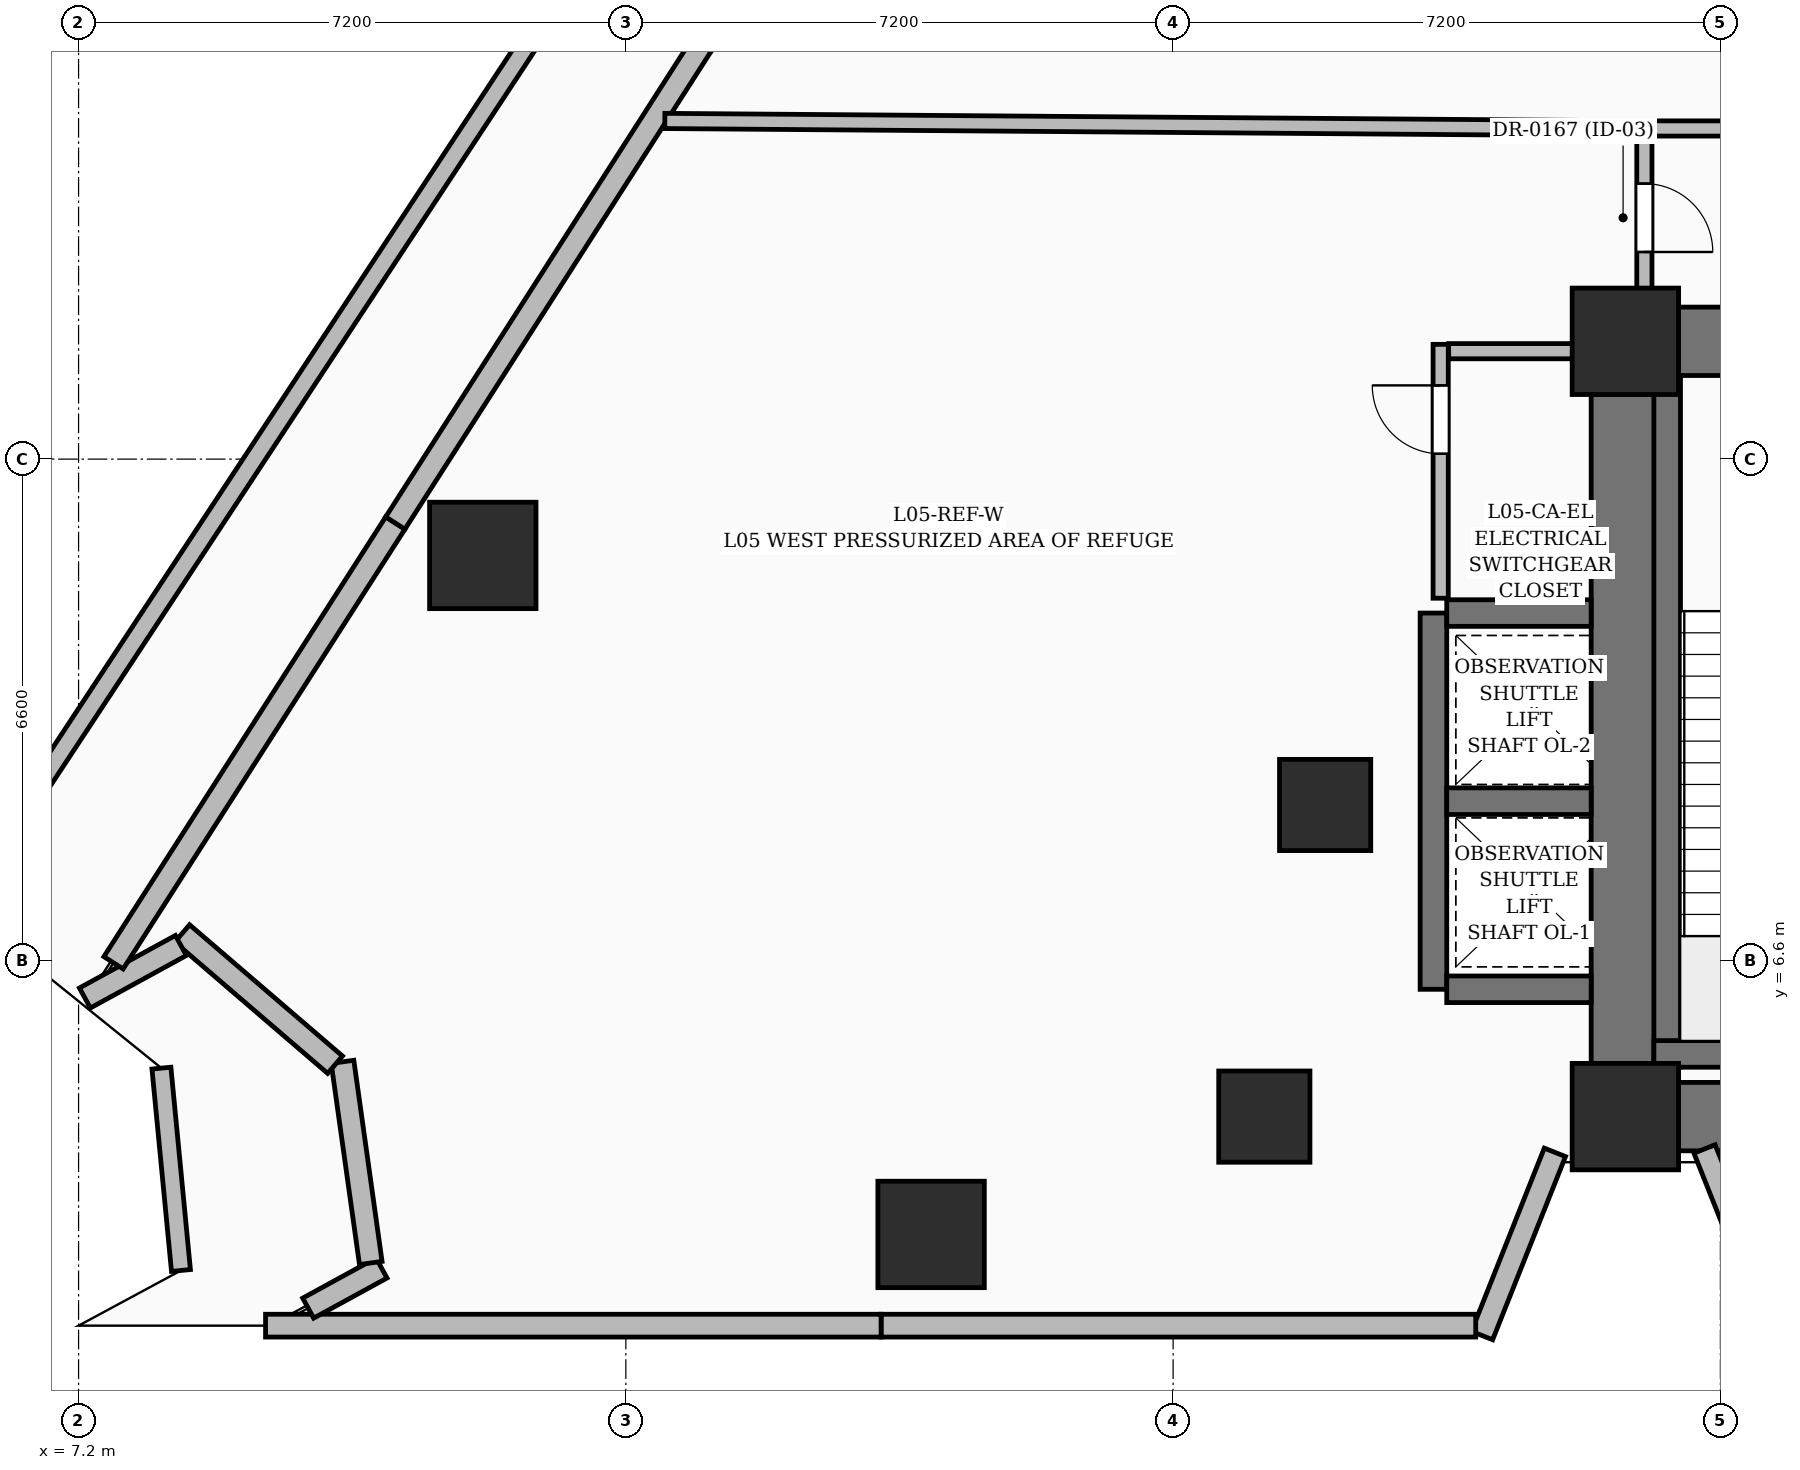
"""IFC4 building model, lengths in metres.
Left out: names, types, materials, properties, quantities, classifications, styles, units other than length and angle.
Written with IfcOpenShell. Run it as: python <this file> out.ifc"""

import sys

from ifc_helpers import new_model, si_unit, direction, frame, frame_2d, origin, origin_2d, place, context, subcontext, project, spatial, rectangle, extrude, element, fill, save


model = new_model("IFC4")
c1 = context("Model", 3, precision=1e-05, world=origin(), true_north=direction((0.0, 1.0)))
c2 = subcontext(c1, "Body", "Model", "MODEL_VIEW")
j1 = project(units=[si_unit("LENGTHUNIT", "METRE"), si_unit("PLANEANGLEUNIT", "RADIAN")], contexts=[c1])
p1 = place(None, origin())
s1 = spatial("IfcSite", under=j1, at=p1, CompositionType="ELEMENT")
p2 = place(p1, origin())
s2 = spatial("IfcBuilding", under=s1, at=p2, CompositionType="ELEMENT")
p3 = place(p2, frame((0.0, 0.0, 26.4)))
s3 = spatial("IfcBuildingStorey", under=s2, at=p3, CompositionType="ELEMENT", Elevation=26.4)
for number, where, z_axis, x_axis in (
    (1, (27.55, 4.55, 0.0), (0.0, 0.0, 1.0), (1.0, 0.0, 0.0)),
    (2, (27.55, 14.75, 0.0), (0.0, 0.0, 1.0), (1.0, 0.0, 0.0)),
):
    element("IfcColumn", number, at=place(p3, frame(where, z_axis=z_axis, x_axis=x_axis)), inside=s3, PredefinedType="COLUMN", context=c2, shape_type="SweptSolid", body=[
        extrude(rectangle(XDim=1.4, YDim=1.4, at=origin_2d()), origin(), (0.0, 0.0, 1.0), 5.4),
    ])
for number, where, z_axis, x_axis in (
    (3, (22.8, 4.55, 0.0), (0.0, 0.0, 1.0), (1.0, 0.0, 0.0)),
    (4, (23.6, 8.65, 0.0), (0.0, 0.0, 1.0), (1.0, 0.0, 0.0)),
):
    element("IfcColumn", number, at=place(p3, frame(where, z_axis=z_axis, x_axis=x_axis)), inside=s3, PredefinedType="COLUMN", context=c2, shape_type="SweptSolid", body=[
        extrude(rectangle(XDim=1.2, YDim=1.2, at=origin_2d()), origin(), (0.0, 0.0, 1.0), 5.4),
    ])
p4 = place(p3, frame((28.25, 4.55, 0.0), z_axis=(0.0, 0.0, 1.0), x_axis=(1.0, 0.0, 0.0)))
e5 = element("IfcWall", 5, at=p4, inside=s3, PredefinedType="SHEAR", context=c2, shape_type="SweptSolid", body=[
    extrude(rectangle(XDim=6.2, YDim=0.9, at=frame_2d((3.1, 0.0))), origin(), (0.0, 0.0, 1.0), 5.4),
])
p5 = place(p3, frame((28.25, 14.75, 0.0), z_axis=(0.0, 0.0, 1.0), x_axis=(1.0, 0.0, 0.0)))
e6 = element("IfcWall", 6, at=p5, inside=s3, PredefinedType="SHEAR", context=c2, shape_type="SweptSolid", body=[
    extrude(rectangle(XDim=6.2, YDim=0.9, at=frame_2d((3.1, 0.0))), origin(), (0.0, 0.0, 1.0), 5.4),
])
p6 = place(p5, frame((0.925, 0.0, 0.0)))
e7 = element("IfcOpeningElement", 7, at=p6, cuts=e6, PredefinedType="OPENING", context=c2, shape_type="SweptSolid", body=[
    extrude(rectangle(XDim=1.05, YDim=2.15, at=frame_2d((0.525, 1.075))), frame((0.0, 0.46, 0.0), z_axis=(0.0, -1.0, 0.0), x_axis=(1.0, 0.0, 0.0)), (0.0, 0.0, 1.0), 0.92),
])
p7 = place(p3, frame((27.55, 5.25, 0.0), z_axis=(0.0, 0.0, 1.0), x_axis=(0.0, 1.0, 0.0)))
e8 = element("IfcWall", 8, at=p7, inside=s3, PredefinedType="SHEAR", context=c2, shape_type="SweptSolid", body=[
    extrude(rectangle(XDim=8.8, YDim=0.9, at=frame_2d((4.4, 0.0))), origin(), (0.0, 0.0, 1.0), 5.4),
])
p8 = place(p3, frame((28.1, 5.2, 0.0), z_axis=(0.0, 0.0, 1.0), x_axis=(0.0, 1.0, 0.0)))
e9 = element("IfcWall", 9, at=p8, inside=s3, PredefinedType="SOLIDWALL", context=c2, shape_type="SweptSolid", body=[
    extrude(rectangle(XDim=9.1, YDim=0.35, at=frame_2d((4.55, 0.0))), origin(), (0.0, 0.0, 1.0), 5.4),
])
p9 = place(p3, frame((27.925, 5.375, 0.0), z_axis=(0.0, 0.0, 1.0), x_axis=(1.0, 0.0, 0.0)))
e10 = element("IfcWall", 10, at=p9, inside=s3, PredefinedType="SOLIDWALL", context=c2, shape_type="SweptSolid", body=[
    extrude(rectangle(XDim=3.55, YDim=0.35, at=frame_2d((1.775, 0.0))), origin(), (0.0, 0.0, 1.0), 5.4),
])
p10 = place(p3, frame((25.025, 6.225, 0.0), z_axis=(0.0, 0.0, 1.0), x_axis=(0.0, 1.0, 0.0)))
e11 = element("IfcWall", 11, at=p10, inside=s3, PredefinedType="SOLIDWALL", context=c2, shape_type="SweptSolid", body=[
    extrude(rectangle(XDim=4.95, YDim=0.35, at=frame_2d((2.475, 0.0))), origin(), (0.0, 0.0, 1.0), 5.4),
])
for number, where, z_axis, x_axis in (
    (12, (25.2, 6.225, 0.0), (0.0, 0.0, 1.0), (1.0, 0.0, 0.0)),
    (13, (25.2, 8.7, 0.0), (0.0, 0.0, 1.0), (1.0, 0.0, 0.0)),
    (14, (25.2, 11.175, 0.0), (0.0, 0.0, 1.0), (1.0, 0.0, 0.0)),
):
    element("IfcWall", number, at=place(p3, frame(where, z_axis=z_axis, x_axis=x_axis)), inside=s3, PredefinedType="SOLIDWALL", context=c2, shape_type="SweptSolid", body=[
        extrude(rectangle(XDim=1.9, YDim=0.35, at=frame_2d((0.95, 0.0))), origin(), (0.0, 0.0, 1.0), 5.4),
    ])
for number, where, z_axis, x_axis in (
    (15, (18.416, 3.0, 0.0), (0.0, 0.0, 1.0), (1.0, 0.0, 0.0)),
    (16, (12.518, 11.933, 0.0), (0.0, 0.0, 1.0), (1.0, 0.0, 0.0)),
):
    element("IfcColumn", number, at=place(p3, frame(where, z_axis=z_axis, x_axis=x_axis)), inside=s3, PredefinedType="COLUMN", context=c2, shape_type="SweptSolid", body=[
        extrude(rectangle(XDim=1.4, YDim=1.4, at=origin_2d()), origin(), (0.0, 0.0, 1.0), 5.4),
    ])
p11 = place(p3, frame((29.466, 1.925, 0.0), z_axis=(0.0, 0.0, 1.0), x_axis=(-0.36946923074, 0.92924296475, 0.0)))
e17 = element("IfcWall", 17, at=p11, inside=s3, PredefinedType="SOLIDWALL", context=c2, shape_type="SweptSolid", body=[
    extrude(rectangle(XDim=2.367, YDim=0.3, at=frame_2d((1.184, 0.0))), origin(), (0.0, 0.0, 1.0), 4.038),
])
p12 = place(p3, frame((26.623, 4.08, 0.0), z_axis=(0.0, 0.0, 1.0), x_axis=(-0.369539870332, -0.929214875169, 0.0)))
e18 = element("IfcWall", 18, at=p12, inside=s3, PredefinedType="SOLIDWALL", context=c2, shape_type="SweptSolid", body=[
    extrude(rectangle(XDim=2.594, YDim=0.3, at=frame_2d((1.297, 0.0))), origin(), (0.0, 0.0, 1.0), 4.038),
])
p13 = place(p3, frame((25.581, 1.8, 0.0), z_axis=(0.0, 0.0, 1.0), x_axis=(-1.0, 0.0, 0.0)))
e19 = element("IfcWall", 19, at=p13, inside=s3, PredefinedType="SOLIDWALL", context=c2, shape_type="SweptSolid", body=[
    extrude(rectangle(XDim=7.823, YDim=0.3, at=frame_2d((3.912, 0.0))), origin(), (0.0, 0.0, 1.0), 5.15),
])
p14 = place(p3, frame((17.758, 1.8, 0.0), z_axis=(0.0, 0.0, 1.0), x_axis=(-1.0, 0.0, 0.0)))
e20 = element("IfcWall", 20, at=p14, inside=s3, PredefinedType="SOLIDWALL", context=c2, shape_type="SweptSolid", body=[
    extrude(rectangle(XDim=8.098, YDim=0.3, at=frame_2d((4.049, 0.0))), origin(), (0.0, 0.0, 1.0), 5.15),
])
p15 = place(p3, frame((10.221, 2.031, 0.0), z_axis=(0.0, 0.0, 1.0), x_axis=(0.877343386297, 0.479863087266, 0.0)))
e21 = element("IfcWall", 21, at=p15, inside=s3, PredefinedType="SOLIDWALL", context=c2, shape_type="SweptSolid", body=[
    extrude(rectangle(XDim=1.099, YDim=0.3, at=frame_2d((0.55, 0.0))), origin(), (0.0, 0.0, 1.0), 5.15),
])
p16 = place(p3, frame((11.044, 2.625, 0.0), z_axis=(0.0, 0.0, 1.0), x_axis=(-0.139079814349, 0.990281174839, 0.0)))
e22 = element("IfcWall", 22, at=p16, inside=s3, PredefinedType="SOLIDWALL", context=c2, shape_type="SweptSolid", body=[
    extrude(rectangle(XDim=2.672, YDim=0.3, at=frame_2d((1.336, 0.0))), origin(), (0.0, 0.0, 1.0), 5.15),
])
p17 = place(p3, frame((10.574, 5.233, 0.0), z_axis=(0.0, 0.0, 1.0), x_axis=(-0.758703874518, 0.651435668958, 0.0)))
e23 = element("IfcWall", 23, at=p17, inside=s3, PredefinedType="SOLIDWALL", context=c2, shape_type="SweptSolid", body=[
    extrude(rectangle(XDim=2.652, YDim=0.3, at=frame_2d((1.326, 0.0))), origin(), (0.0, 0.0, 1.0), 5.15),
])
p18 = place(p3, frame((8.546, 6.802, 0.0), z_axis=(0.0, 0.0, 1.0), x_axis=(-0.877298620335, -0.479944924714, 0.0)))
e24 = element("IfcWall", 24, at=p18, inside=s3, PredefinedType="SOLIDWALL", context=c2, shape_type="SweptSolid", body=[
    extrude(rectangle(XDim=1.44, YDim=0.3, at=frame_2d((0.72, 0.0))), origin(), (0.0, 0.0, 1.0), 5.15),
])
p19 = place(p3, frame((7.66, 6.574, 0.0), z_axis=(0.0, 0.0, 1.0), x_axis=(0.539514369137, 0.84197639248, 0.0)))
e25 = element("IfcWall", 25, at=p19, inside=s3, PredefinedType="SOLIDWALL", context=c2, shape_type="SweptSolid", body=[
    extrude(rectangle(XDim=6.872, YDim=0.3, at=frame_2d((3.436, 0.0))), origin(), (0.0, 0.0, 1.0), 5.15),
])
p20 = place(p3, frame((11.367, 12.359, 0.0), z_axis=(0.0, 0.0, 1.0), x_axis=(0.539548093607, 0.841954781853, 0.0)))
e26 = element("IfcWall", 26, at=p20, inside=s3, PredefinedType="SOLIDWALL", context=c2, shape_type="SweptSolid", body=[
    extrude(rectangle(XDim=7.481, YDim=0.3, at=frame_2d((3.741, 0.0))), origin(), (0.0, 0.0, 1.0), 5.15),
])
p21 = place(p3, frame((8.547, 2.526, 0.0), z_axis=(0.0, 0.0, 1.0), x_axis=(-0.096122895787, 0.995369473565, 0.0)))
e27 = element("IfcWall", 27, at=p21, inside=s3, PredefinedType="PARAPET", context=c2, shape_type="SweptSolid", body=[
    extrude(rectangle(XDim=2.675, YDim=0.25, at=frame_2d((1.337, 0.0))), origin(), (0.0, 0.0, 1.0), 1.15),
])
p22 = place(p3, frame((4.861, 6.142, 0.0), z_axis=(0.0, 0.0, 1.0), x_axis=(0.550210507218, 0.83502598627, 0.0)))
e28 = element("IfcWall", 28, at=p22, inside=s3, PredefinedType="PARAPET", context=c2, shape_type="SweptSolid", body=[
    extrude(rectangle(XDim=41.146, YDim=0.25, at=frame_2d((20.573, 0.0))), origin(), (0.0, 0.0, 1.0), 1.15),
])
p23 = place(p3, frame((25.12, 11.37, 0.0), z_axis=(0.0, 0.0, 1.0), x_axis=(0.0, 1.0, 0.0)))
e29 = element("IfcWall", 29, at=p23, inside=s3, PredefinedType="PARTITIONING", context=c2, shape_type="SweptSolid", body=[
    extrude(rectangle(XDim=3.34, YDim=0.2, at=frame_2d((1.67, 0.0))), origin(), (0.0, 0.0, 1.0), 5.15),
])
p24 = place(p23, frame((1.9, 0.0, 0.0)))
e30 = element("IfcOpeningElement", 30, at=p24, cuts=e29, PredefinedType="OPENING", context=c2, shape_type="SweptSolid", body=[
    extrude(rectangle(XDim=0.9, YDim=2.1, at=frame_2d((0.45, 1.05))), frame((0.0, 0.11, 0.0), z_axis=(0.0, -1.0, 0.0), x_axis=(1.0, 0.0, 0.0)), (0.0, 0.0, 1.0), 0.22),
])
p25 = place(p3, frame((25.225, 14.62, 0.0), z_axis=(0.0, 0.0, 1.0), x_axis=(1.0, 0.0, 0.0)))
e31 = element("IfcWall", 31, at=p25, inside=s3, PredefinedType="PARTITIONING", context=c2, shape_type="SweptSolid", body=[
    extrude(rectangle(XDim=1.86, YDim=0.2, at=frame_2d((0.93, 0.0))), origin(), (0.0, 0.0, 1.0), 5.15),
])
p26 = place(p3, frame((32.5, 17.55, 0.0), z_axis=(0.0, 0.0, 1.0), x_axis=(-1.0, 0.0, 0.0)))
e32 = element("IfcWall", 32, at=p26, inside=s3, PredefinedType="PARTITIONING", context=c2, shape_type="SweptSolid", body=[
    extrude(rectangle(XDim=4.7, YDim=0.2, at=frame_2d((2.35, 0.0))), origin(), (0.0, 0.0, 1.0), 5.15),
])
p27 = place(p26, frame((1.542, 0.0, 0.0)))
e33 = element("IfcOpeningElement", 33, at=p27, cuts=e32, PredefinedType="OPENING", context=c2, shape_type="SweptSolid", body=[
    extrude(rectangle(XDim=1.5, YDim=2.2, at=frame_2d((0.75, 1.1))), frame((0.0, 0.11, 0.0), z_axis=(0.0, -1.0, 0.0), x_axis=(1.0, 0.0, 0.0)), (0.0, 0.0, 1.0), 0.22),
])
p28 = place(p3, frame((27.8, 17.465, 0.0), z_axis=(0.0, 0.0, 1.0), x_axis=(0.0, -1.0, 0.0)))
e34 = element("IfcWall", 34, at=p28, inside=s3, PredefinedType="PARTITIONING", context=c2, shape_type="SweptSolid", body=[
    extrude(rectangle(XDim=2.265, YDim=0.2, at=frame_2d((1.133, 0.0))), origin(), (0.0, 0.0, 1.0), 5.15),
])
p29 = place(p28, frame((0.64, 0.0, 0.0)))
e35 = element("IfcOpeningElement", 35, at=p29, cuts=e34, PredefinedType="OPENING", context=c2, shape_type="SweptSolid", body=[
    extrude(rectangle(XDim=0.9, YDim=2.1, at=frame_2d((0.45, 1.05))), frame((0.0, 0.11, 0.0), z_axis=(0.0, -1.0, 0.0), x_axis=(1.0, 0.0, 0.0)), (0.0, 0.0, 1.0), 0.22),
])
p30 = place(p3, frame((14.913, 17.649, 0.0), z_axis=(0.0, 0.0, 1.0), x_axis=(0.999970566641, -0.00767240844, 0.0)))
e36 = element("IfcWall", 36, at=p30, inside=s3, PredefinedType="PARTITIONING", context=c2, shape_type="SweptSolid", body=[
    extrude(rectangle(XDim=12.887, YDim=0.2, at=frame_2d((6.444, 0.0))), origin(), (0.0, 0.0, 1.0), 4.028),
])
p31 = place(p24, origin())
e37 = element("IfcDoor", 37, at=p31, inside=s3, OperationType="SINGLE_SWING_RIGHT", PredefinedType="DOOR", context=c2, shape_type="SweptSolid", body=[
    extrude(rectangle(XDim=0.9, YDim=2.1, at=frame_2d((0.45, 1.05))), frame((0.0, 0.025, 0.0), z_axis=(0.0, -1.0, 0.0), x_axis=(1.0, 0.0, 0.0)), (0.0, 0.0, 1.0), 0.05),
])
fill(e30, e37)
p32 = place(p29, origin())
e38 = element("IfcDoor", 38, at=p32, inside=s3, OperationType="SINGLE_SWING_RIGHT", PredefinedType="DOOR", context=c2, shape_type="SweptSolid", body=[
    extrude(rectangle(XDim=0.9, YDim=2.1, at=frame_2d((0.45, 1.05))), frame((0.0, 0.025, 0.0), z_axis=(0.0, -1.0, 0.0), x_axis=(1.0, 0.0, 0.0)), (0.0, 0.0, 1.0), 0.05),
])
fill(e35, e38)
save(model, sys.argv[1])
